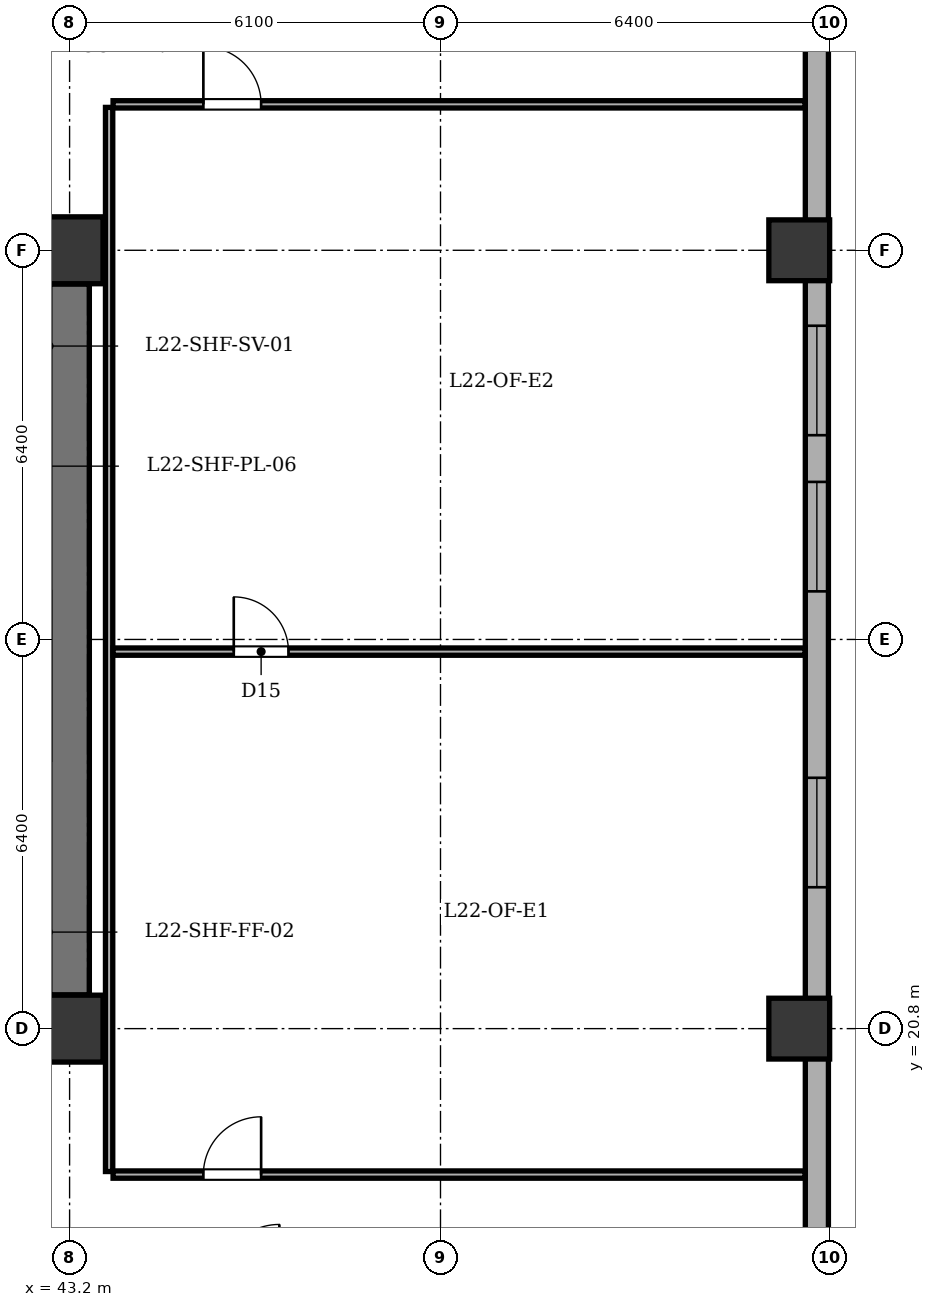
"""IFC4 building model, lengths in metres.
Left out: names, types, materials, properties, quantities, classifications, styles, units other than length and angle.
Written with IfcOpenShell. Run it as: python <this file> out.ifc"""

import sys

from ifc_helpers import new_model, si_unit, direction, frame, frame_2d, origin, origin_2d, place, context, subcontext, project, spatial, rectangle, extrude, element, fill, save


model = new_model("IFC4")
c1 = context("Model", 3, precision=1e-05, world=origin(), true_north=direction((0.0, 1.0)))
c2 = subcontext(c1, "Body", "Model", "MODEL_VIEW")
j1 = project(units=[si_unit("LENGTHUNIT", "METRE"), si_unit("PLANEANGLEUNIT", "RADIAN")], contexts=[c1])
p1 = place(None, origin())
s1 = spatial("IfcSite", under=j1, at=p1, CompositionType="ELEMENT")
p2 = place(p1, origin())
s2 = spatial("IfcBuilding", under=s1, at=p2, CompositionType="ELEMENT")
p3 = place(p2, frame((0.0, 0.0, 90.6)))
s3 = spatial("IfcBuildingStorey", under=s2, at=p3, CompositionType="ELEMENT", Elevation=90.6)
for number, where, z_axis, x_axis in (
    (1, (43.2, 20.8, 0.0), (0.0, 0.0, 1.0), (1.0, 0.0, 0.0)),
    (2, (43.2, 33.6, 0.0), (0.0, 0.0, 1.0), (1.0, 0.0, 0.0)),
):
    element("IfcColumn", number, at=place(p3, frame(where, z_axis=z_axis, x_axis=x_axis)), inside=s3, PredefinedType="COLUMN", context=c2, shape_type="SweptSolid", body=[
        extrude(rectangle(XDim=1.1, YDim=1.1, at=origin_2d()), origin(), (0.0, 0.0, 1.0), 3.9),
    ])
for number, where, z_axis, x_axis in (
    (3, (55.2, 20.8, 0.0), (0.0, 0.0, 1.0), (1.0, 0.0, 0.0)),
    (4, (55.2, 33.6, 0.0), (0.0, 0.0, 1.0), (1.0, 0.0, 0.0)),
):
    element("IfcColumn", number, at=place(p3, frame(where, z_axis=z_axis, x_axis=x_axis)), inside=s3, PredefinedType="COLUMN", context=c2, shape_type="SweptSolid", body=[
        extrude(rectangle(XDim=1.0, YDim=1.0, at=origin_2d()), origin(), (0.0, 0.0, 1.0), 3.9),
    ])
p4 = place(p3, frame((55.49, 47.9, 0.0), z_axis=(0.0, 0.0, 1.0), x_axis=(0.0, -1.0, 0.0)))
e5 = element("IfcWall", 5, at=p4, inside=s3, PredefinedType="STANDARD", context=c2, shape_type="SweptSolid", body=[
    extrude(rectangle(XDim=35.0, YDim=0.38, at=frame_2d((17.5, 0.0))), origin(), (0.0, 0.0, 1.0), 2.835),
])
p5 = place(p4, frame((2.693, 0.0, 0.8)))
e6 = element("IfcOpeningElement", 6, at=p5, cuts=e5, PredefinedType="OPENING", context=c2, shape_type="SweptSolid", body=[
    extrude(rectangle(XDim=1.8, YDim=1.9, at=frame_2d((0.9, 0.95))), frame((0.0, 0.2, 0.0), z_axis=(0.0, -1.0, 0.0), x_axis=(1.0, 0.0, 0.0)), (0.0, 0.0, 1.0), 0.4),
])
p6 = place(p4, frame((7.457, 0.0, 0.8)))
e7 = element("IfcOpeningElement", 7, at=p6, cuts=e5, PredefinedType="OPENING", context=c2, shape_type="SweptSolid", body=[
    extrude(rectangle(XDim=2.4, YDim=1.9, at=frame_2d((1.2, 0.95))), frame((0.0, 0.2, 0.0), z_axis=(0.0, -1.0, 0.0), x_axis=(1.0, 0.0, 0.0)), (0.0, 0.0, 1.0), 0.4),
])
p7 = place(p4, frame((15.541, 0.0, 0.8)))
e8 = element("IfcOpeningElement", 8, at=p7, cuts=e5, PredefinedType="OPENING", context=c2, shape_type="SweptSolid", body=[
    extrude(rectangle(XDim=1.8, YDim=1.9, at=frame_2d((0.9, 0.95))), frame((0.0, 0.2, 0.0), z_axis=(0.0, -1.0, 0.0), x_axis=(1.0, 0.0, 0.0)), (0.0, 0.0, 1.0), 0.4),
])
p8 = place(p4, frame((18.109, 0.0, 0.8)))
e9 = element("IfcOpeningElement", 9, at=p8, cuts=e5, PredefinedType="OPENING", context=c2, shape_type="SweptSolid", body=[
    extrude(rectangle(XDim=1.8, YDim=1.9, at=frame_2d((0.9, 0.95))), frame((0.0, 0.2, 0.0), z_axis=(0.0, -1.0, 0.0), x_axis=(1.0, 0.0, 0.0)), (0.0, 0.0, 1.0), 0.4),
])
p9 = place(p4, frame((22.975, 0.0, 0.8)))
e10 = element("IfcOpeningElement", 10, at=p9, cuts=e5, PredefinedType="OPENING", context=c2, shape_type="SweptSolid", body=[
    extrude(rectangle(XDim=1.8, YDim=1.9, at=frame_2d((0.9, 0.95))), frame((0.0, 0.2, 0.0), z_axis=(0.0, -1.0, 0.0), x_axis=(1.0, 0.0, 0.0)), (0.0, 0.0, 1.0), 0.4),
])
p10 = place(p4, frame((31.175, 0.0, 0.8)))
e11 = element("IfcOpeningElement", 11, at=p10, cuts=e5, PredefinedType="OPENING", context=c2, shape_type="SweptSolid", body=[
    extrude(rectangle(XDim=1.8, YDim=1.9, at=frame_2d((0.9, 0.95))), frame((0.0, 0.2, 0.0), z_axis=(0.0, -1.0, 0.0), x_axis=(1.0, 0.0, 0.0)), (0.0, 0.0, 1.0), 0.4),
])
p11 = place(p3, frame((43.2, 21.355, 0.0), z_axis=(0.0, 0.0, 1.0), x_axis=(0.0, 1.0, 0.0)))
e12 = element("IfcWall", 12, at=p11, inside=s3, PredefinedType="SHEAR", context=c2, shape_type="SweptSolid", body=[
    extrude(rectangle(XDim=11.69, YDim=0.65, at=frame_2d((5.845, 0.0))), origin(), (0.0, 0.0, 1.0), 3.45),
])
p12 = place(p3, frame((43.85, 18.45, 0.0), z_axis=(0.0, 0.0, 1.0), x_axis=(0.0, 1.0, 0.0)))
e13 = element("IfcWall", 13, at=p12, inside=s3, PredefinedType="PARTITIONING", context=c2, shape_type="SweptSolid", body=[
    extrude(rectangle(XDim=17.5, YDim=0.12, at=frame_2d((8.75, 0.0))), origin(), (0.0, 0.0, 1.0), 2.035),
])
p13 = place(p3, frame((43.915, 18.4, 0.0), z_axis=(0.0, 0.0, 1.0), x_axis=(1.0, 0.0, 0.0)))
e14 = element("IfcWall", 14, at=p13, inside=s3, PredefinedType="PARTITIONING", context=c2, shape_type="SweptSolid", body=[
    extrude(rectangle(XDim=11.38, YDim=0.12, at=frame_2d((5.69, 0.0))), origin(), (0.0, 0.0, 1.0), 3.45),
])
p14 = place(p13, frame((1.485, 0.0, 0.0)))
e15 = element("IfcOpeningElement", 15, at=p14, cuts=e14, PredefinedType="OPENING", context=c2, shape_type="SweptSolid", body=[
    extrude(rectangle(XDim=0.95, YDim=2.1, at=frame_2d((0.475, 1.05))), frame((0.0, 0.07, 0.0), z_axis=(0.0, -1.0, 0.0), x_axis=(1.0, 0.0, 0.0)), (0.0, 0.0, 1.0), 0.14),
])
p15 = place(p3, frame((43.915, 36.0, 0.0), z_axis=(0.0, 0.0, 1.0), x_axis=(1.0, 0.0, 0.0)))
e16 = element("IfcWall", 16, at=p15, inside=s3, PredefinedType="PARTITIONING", context=c2, shape_type="SweptSolid", body=[
    extrude(rectangle(XDim=11.38, YDim=0.12, at=frame_2d((5.69, 0.0))), origin(), (0.0, 0.0, 1.0), 3.45),
])
p16 = place(p15, frame((1.485, 0.0, 0.0)))
e17 = element("IfcOpeningElement", 17, at=p16, cuts=e16, PredefinedType="OPENING", context=c2, shape_type="SweptSolid", body=[
    extrude(rectangle(XDim=0.95, YDim=2.1, at=frame_2d((0.475, 1.05))), frame((0.0, 0.07, 0.0), z_axis=(0.0, -1.0, 0.0), x_axis=(1.0, 0.0, 0.0)), (0.0, 0.0, 1.0), 0.14),
])
p17 = place(p3, frame((43.915, 27.0, 0.0), z_axis=(0.0, 0.0, 1.0), x_axis=(1.0, 0.0, 0.0)))
e18 = element("IfcWall", 18, at=p17, inside=s3, PredefinedType="PARTITIONING", context=c2, shape_type="SweptSolid", body=[
    extrude(rectangle(XDim=11.38, YDim=0.12, at=frame_2d((5.69, 0.0))), origin(), (0.0, 0.0, 1.0), 2.885),
])
p18 = place(p17, frame((1.985, 0.0, 0.0)))
e19 = element("IfcOpeningElement", 19, at=p18, cuts=e18, PredefinedType="OPENING", context=c2, shape_type="SweptSolid", body=[
    extrude(rectangle(XDim=0.9, YDim=2.05, at=frame_2d((0.45, 1.025))), frame((0.0, 0.07, 0.0), z_axis=(0.0, -1.0, 0.0), x_axis=(1.0, 0.0, 0.0)), (0.0, 0.0, 1.0), 0.14),
])
p19 = place(p7, origin())
e20 = element("IfcWindow", 20, at=p19, inside=s3, PartitioningType="SINGLE_PANEL", PredefinedType="WINDOW", context=c2, shape_type="SweptSolid", body=[
    extrude(rectangle(XDim=1.8, YDim=1.9, at=frame_2d((0.9, 0.95))), frame((0.0, -0.01, 0.0), z_axis=(0.0, -1.0, 0.0), x_axis=(1.0, 0.0, 0.0)), (0.0, 0.0, 1.0), 0.06),
])
fill(e8, e20)
p20 = place(p8, origin())
e21 = element("IfcWindow", 21, at=p20, inside=s3, PartitioningType="SINGLE_PANEL", PredefinedType="WINDOW", context=c2, shape_type="SweptSolid", body=[
    extrude(rectangle(XDim=1.8, YDim=1.9, at=frame_2d((0.9, 0.95))), frame((0.0, -0.01, 0.0), z_axis=(0.0, -1.0, 0.0), x_axis=(1.0, 0.0, 0.0)), (0.0, 0.0, 1.0), 0.06),
])
fill(e9, e21)
p21 = place(p9, origin())
e22 = element("IfcWindow", 22, at=p21, inside=s3, PartitioningType="SINGLE_PANEL", PredefinedType="WINDOW", context=c2, shape_type="SweptSolid", body=[
    extrude(rectangle(XDim=1.8, YDim=1.9, at=frame_2d((0.9, 0.95))), frame((0.0, -0.01, 0.0), z_axis=(0.0, -1.0, 0.0), x_axis=(1.0, 0.0, 0.0)), (0.0, 0.0, 1.0), 0.06),
])
fill(e10, e22)
p22 = place(p18, origin())
e23 = element("IfcDoor", 23, at=p22, inside=s3, OperationType="SINGLE_SWING_LEFT", PredefinedType="DOOR", context=c2, shape_type="SweptSolid", body=[
    extrude(rectangle(XDim=0.9, YDim=2.05, at=frame_2d((0.45, 1.025))), frame((0.0, 0.025, 0.0), z_axis=(0.0, -1.0, 0.0), x_axis=(1.0, 0.0, 0.0)), (0.0, 0.0, 1.0), 0.05),
])
fill(e19, e23)
p23 = place(p14, origin())
e24 = element("IfcDoor", 24, at=p23, inside=s3, OperationType="SINGLE_SWING_RIGHT", PredefinedType="DOOR", context=c2, shape_type="SweptSolid", body=[
    extrude(rectangle(XDim=0.95, YDim=2.1, at=frame_2d((0.475, 1.05))), frame((0.0, 0.025, 0.0), z_axis=(0.0, -1.0, 0.0), x_axis=(1.0, 0.0, 0.0)), (0.0, 0.0, 1.0), 0.05),
])
fill(e15, e24)
p24 = place(p16, origin())
e25 = element("IfcDoor", 25, at=p24, inside=s3, OperationType="SINGLE_SWING_LEFT", PredefinedType="DOOR", context=c2, shape_type="SweptSolid", body=[
    extrude(rectangle(XDim=0.95, YDim=2.1, at=frame_2d((0.475, 1.05))), frame((0.0, 0.025, 0.0), z_axis=(0.0, -1.0, 0.0), x_axis=(1.0, 0.0, 0.0)), (0.0, 0.0, 1.0), 0.05),
])
fill(e17, e25)
save(model, sys.argv[1])
